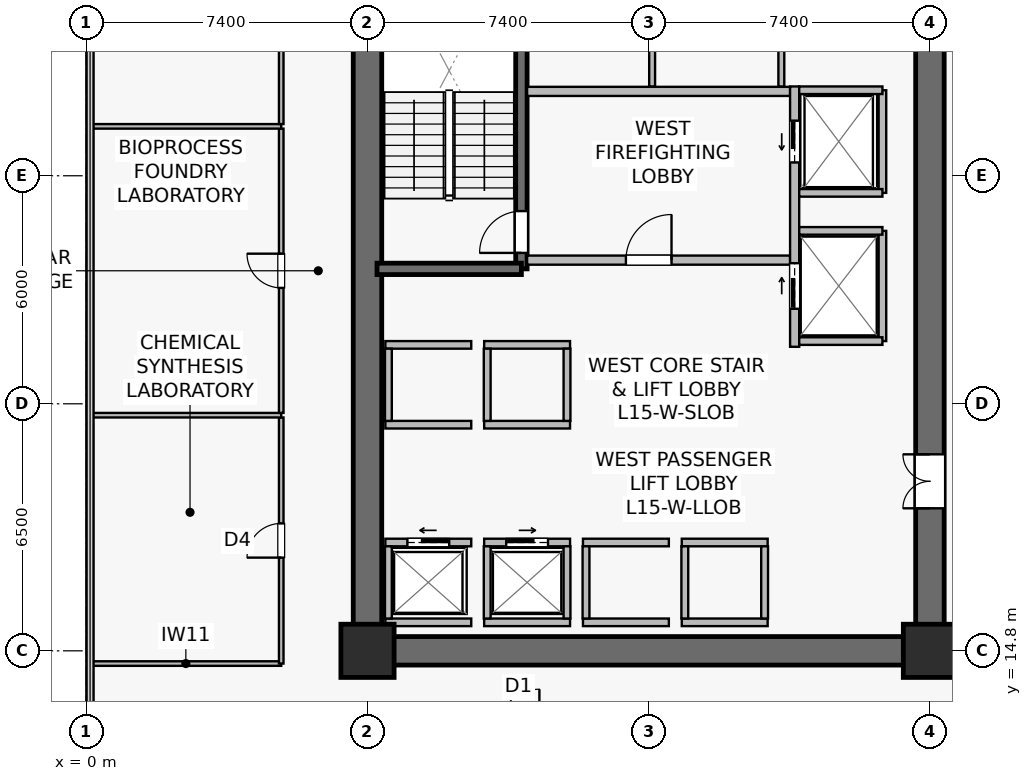
"""IFC4 building model, lengths in metres.
Left out: names, types, materials, properties, quantities, classifications, styles, units other than length and angle.
Written with IfcOpenShell. Run it as: python <this file> out.ifc"""

import sys

from ifc_helpers import new_model, si_unit, direction, frame, frame_2d, origin, origin_2d, place, context, subcontext, project, spatial, rectangle, extrude, source, transform, mapped, element, fill, save


model = new_model("IFC4")
c1 = context("Model", 3, precision=1e-05, world=origin(), true_north=direction((0.0, 1.0)))
c2 = subcontext(c1, "Body", "Model", "MODEL_VIEW")
j1 = project(units=[si_unit("LENGTHUNIT", "METRE"), si_unit("PLANEANGLEUNIT", "RADIAN")], contexts=[c1])
p1 = place(None, origin())
s1 = spatial("IfcSite", under=j1, at=p1, CompositionType="ELEMENT")
p2 = place(p1, origin())
s2 = spatial("IfcBuilding", under=s1, at=p2, CompositionType="ELEMENT")
p3 = place(p2, frame((0.0, 0.0, 62.1)))
s3 = spatial("IfcBuildingStorey", under=s2, at=p3, CompositionType="ELEMENT", Elevation=62.1)
p4 = place(p3, frame((7.025, 14.8, 0.0), z_axis=(0.0, 0.0, 1.0), x_axis=(1.0, 0.0, 0.0)))
e1 = element("IfcWall", 1, at=p4, inside=s3, PredefinedType="SHEAR", context=c2, shape_type="SweptSolid", body=[
    extrude(rectangle(XDim=15.55, YDim=0.75, at=frame_2d((7.775, 0.0))), origin(), (0.0, 0.0, 1.0), 3.78),
])
p5 = place(p3, frame((7.4, 15.175, 0.0), z_axis=(0.0, 0.0, 1.0), x_axis=(0.0, 1.0, 0.0)))
e2 = element("IfcWall", 2, at=p5, inside=s3, PredefinedType="SHEAR", context=c2, shape_type="SweptSolid", body=[
    extrude(rectangle(XDim=18.25, YDim=0.75, at=frame_2d((9.125, 0.0))), origin(), (0.0, 0.0, 1.0), 3.78),
])
p6 = place(p3, frame((22.2, 15.175, 0.0), z_axis=(0.0, 0.0, 1.0), x_axis=(0.0, 1.0, 0.0)))
e3 = element("IfcWall", 3, at=p6, inside=s3, PredefinedType="SHEAR", context=c2, shape_type="SweptSolid", body=[
    extrude(rectangle(XDim=18.25, YDim=0.75, at=frame_2d((9.125, 0.0))), origin(), (0.0, 0.0, 1.0), 3.78),
])
p7 = place(p6, frame((3.375, 0.0, 0.0)))
e4 = element("IfcOpeningElement", 4, at=p7, cuts=e3, PredefinedType="OPENING", context=c2, shape_type="SweptSolid", body=[
    extrude(rectangle(XDim=1.42, YDim=2.2, at=frame_2d((0.71, 1.1))), frame((0.0, 0.385, 0.0), z_axis=(0.0, -1.0, 0.0), x_axis=(1.0, 0.0, 0.0)), (0.0, 0.0, 1.0), 0.77),
])
p8 = place(p3, frame((11.45, 24.85, 0.0), z_axis=(0.0, 0.0, 1.0), x_axis=(0.0, 1.0, 0.0)))
e5 = element("IfcWall", 5, at=p8, inside=s3, PredefinedType="SHEAR", context=c2, shape_type="SweptSolid", body=[
    extrude(rectangle(XDim=8.63, YDim=0.3, at=frame_2d((4.315, 0.0))), origin(), (0.0, 0.0, 1.0), 3.78),
])
p9 = place(p8, frame((0.42, 0.0, 0.0)))
e6 = element("IfcOpeningElement", 6, at=p9, cuts=e5, PredefinedType="OPENING", context=c2, shape_type="SweptSolid", body=[
    extrude(rectangle(XDim=1.1, YDim=2.15, at=frame_2d((0.55, 1.075))), frame((0.0, 0.16, 0.0), z_axis=(0.0, -1.0, 0.0), x_axis=(1.0, 0.0, 0.0)), (0.0, 0.0, 1.0), 0.32),
])
p10 = place(p3, frame((7.65, 24.85, 0.0), z_axis=(0.0, 0.0, 1.0), x_axis=(1.0, 0.0, 0.0)))
e7 = element("IfcWall", 7, at=p10, inside=s3, PredefinedType="SHEAR", context=c2, shape_type="SweptSolid", body=[
    extrude(rectangle(XDim=3.8, YDim=0.3, at=frame_2d((1.9, 0.0))), origin(), (0.0, 0.0, 1.0), 3.78),
])
m1 = source(origin(), c2, "Body", "SweptSolid", [
    extrude(rectangle(XDim=1.4, YDim=1.4, at=origin_2d()), origin(), (0.0, 0.0, 1.0), 4.1),
])
for number, where, z_axis, x_axis in (
    (8, (7.4, 14.8, 0.0), (0.0, 0.0, 1.0), (1.0, 0.0, 0.0)),
    (9, (22.2, 14.8, 0.0), (0.0, 0.0, 1.0), (1.0, 0.0, 0.0)),
):
    element("IfcColumn", number, at=place(p3, frame(where, z_axis=z_axis, x_axis=x_axis)), inside=s3, PredefinedType="COLUMN", context=c2, shape_type="MappedRepresentation", body=[
        mapped(m1, transform((0.0, 0.0, 0.0), scale=1.0)),
    ])
p11 = place(p3, frame((11.6, 25.08, 0.0), z_axis=(0.0, 0.0, 1.0), x_axis=(1.0, 0.0, 0.0)))
e10 = element("IfcWall", 10, at=p11, inside=s3, PredefinedType="SOLIDWALL", context=c2, shape_type="SweptSolid", body=[
    extrude(rectangle(XDim=6.92, YDim=0.24, at=frame_2d((3.46, 0.0))), origin(), (0.0, 0.0, 1.0), 3.115),
])
p12 = place(p11, frame((2.6, 0.0, 0.0)))
e11 = element("IfcOpeningElement", 11, at=p12, cuts=e10, PredefinedType="OPENING", context=c2, shape_type="SweptSolid", body=[
    extrude(rectangle(XDim=1.2, YDim=2.16, at=frame_2d((0.6, 1.08))), frame((0.0, 0.13, 0.0), z_axis=(0.0, -1.0, 0.0), x_axis=(1.0, 0.0, 0.0)), (0.0, 0.0, 1.0), 0.26),
])
p13 = place(p3, frame((11.6, 29.52, 0.0), z_axis=(0.0, 0.0, 1.0), x_axis=(1.0, 0.0, 0.0)))
e12 = element("IfcWall", 12, at=p13, inside=s3, PredefinedType="SOLIDWALL", context=c2, shape_type="SweptSolid", body=[
    extrude(rectangle(XDim=6.92, YDim=0.24, at=frame_2d((3.46, 0.0))), origin(), (0.0, 0.0, 1.0), 3.115),
])
p14 = place(p3, frame((18.64, 22.8, 0.0), z_axis=(0.0, 0.0, 1.0), x_axis=(0.0, 1.0, 0.0)))
e13 = element("IfcWall", 13, at=p14, inside=s3, PredefinedType="SOLIDWALL", context=c2, shape_type="SweptSolid", body=[
    extrude(rectangle(XDim=6.85, YDim=0.24, at=frame_2d((3.425, 0.0))), origin(), (0.0, 0.0, 1.0), 2.865),
])
p15 = place(p14, frame((4.85, 0.0, 0.0)))
e14 = element("IfcOpeningElement", 14, at=p15, cuts=e13, PredefinedType="OPENING", context=c2, shape_type="SweptSolid", body=[
    extrude(rectangle(XDim=1.1, YDim=2.22, at=frame_2d((0.55, 1.11))), frame((0.0, 0.13, 0.0), z_axis=(0.0, -1.0, 0.0), x_axis=(1.0, 0.0, 0.0)), (0.0, 0.0, 1.0), 0.26),
])
p16 = place(p14, frame((1.0, 0.0, 0.0)))
e15 = element("IfcOpeningElement", 15, at=p16, cuts=e13, PredefinedType="OPENING", context=c2, shape_type="SweptSolid", body=[
    extrude(rectangle(XDim=1.2, YDim=2.22, at=frame_2d((0.6, 1.11))), frame((0.0, 0.13, 0.0), z_axis=(0.0, -1.0, 0.0), x_axis=(1.0, 0.0, 0.0)), (0.0, 0.0, 1.0), 0.26),
])
p17 = place(p3, frame((7.87, 17.65, 0.0), z_axis=(0.0, 0.0, 1.0), x_axis=(1.0, 0.0, 0.0)))
e16 = element("IfcWall", 16, at=p17, inside=s3, PredefinedType="SOLIDWALL", context=c2, shape_type="SweptSolid", body=[
    extrude(rectangle(XDim=2.26, YDim=0.2, at=frame_2d((1.13, 0.0))), origin(), (0.0, 0.0, 1.0), 3.78),
])
p18 = place(p17, frame((0.58, 0.0, 0.0)))
e17 = element("IfcOpeningElement", 17, at=p18, cuts=e16, PredefinedType="OPENING", context=c2, shape_type="SweptSolid", body=[
    extrude(rectangle(XDim=1.1, YDim=2.22, at=frame_2d((0.55, 1.11))), frame((0.0, 0.11, 0.0), z_axis=(0.0, -1.0, 0.0), x_axis=(1.0, 0.0, 0.0)), (0.0, 0.0, 1.0), 0.22),
])
p19 = place(p3, frame((7.87, 15.55, 0.0), z_axis=(0.0, 0.0, 1.0), x_axis=(1.0, 0.0, 0.0)))
e18 = element("IfcWall", 18, at=p19, inside=s3, PredefinedType="SOLIDWALL", context=c2, shape_type="SweptSolid", body=[
    extrude(rectangle(XDim=2.26, YDim=0.2, at=frame_2d((1.13, 0.0))), origin(), (0.0, 0.0, 1.0), 3.78),
])
p20 = place(p3, frame((7.95, 15.65, 0.0), z_axis=(0.0, 0.0, 1.0), x_axis=(0.0, 1.0, 0.0)))
e19 = element("IfcWall", 19, at=p20, inside=s3, PredefinedType="SOLIDWALL", context=c2, shape_type="SweptSolid", body=[
    extrude(rectangle(XDim=1.9, YDim=0.18, at=frame_2d((0.95, 0.0))), origin(), (0.0, 0.0, 1.0), 3.78),
])
p21 = place(p3, frame((10.47, 17.65, 0.0), z_axis=(0.0, 0.0, 1.0), x_axis=(1.0, 0.0, 0.0)))
e20 = element("IfcWall", 20, at=p21, inside=s3, PredefinedType="SOLIDWALL", context=c2, shape_type="SweptSolid", body=[
    extrude(rectangle(XDim=2.26, YDim=0.2, at=frame_2d((1.13, 0.0))), origin(), (0.0, 0.0, 1.0), 3.78),
])
p22 = place(p21, frame((0.58, 0.0, 0.0)))
e21 = element("IfcOpeningElement", 21, at=p22, cuts=e20, PredefinedType="OPENING", context=c2, shape_type="SweptSolid", body=[
    extrude(rectangle(XDim=1.1, YDim=2.22, at=frame_2d((0.55, 1.11))), frame((0.0, 0.11, 0.0), z_axis=(0.0, -1.0, 0.0), x_axis=(1.0, 0.0, 0.0)), (0.0, 0.0, 1.0), 0.22),
])
p23 = place(p3, frame((10.47, 15.55, 0.0), z_axis=(0.0, 0.0, 1.0), x_axis=(1.0, 0.0, 0.0)))
e22 = element("IfcWall", 22, at=p23, inside=s3, PredefinedType="SOLIDWALL", context=c2, shape_type="SweptSolid", body=[
    extrude(rectangle(XDim=2.26, YDim=0.2, at=frame_2d((1.13, 0.0))), origin(), (0.0, 0.0, 1.0), 3.78),
])
for number, where, z_axis, x_axis in (
    (23, (10.55, 15.65, 0.0), (0.0, 0.0, 1.0), (0.0, 1.0, 0.0)),
    (24, (12.65, 15.65, 0.0), (0.0, 0.0, 1.0), (0.0, 1.0, 0.0)),
):
    element("IfcWall", number, at=place(p3, frame(where, z_axis=z_axis, x_axis=x_axis)), inside=s3, PredefinedType="SOLIDWALL", context=c2, shape_type="SweptSolid", body=[
        extrude(rectangle(XDim=1.9, YDim=0.18, at=frame_2d((0.95, 0.0))), origin(), (0.0, 0.0, 1.0), 3.78),
    ])
for number, where, z_axis, x_axis in (
    (25, (13.07, 17.65, 0.0), (0.0, 0.0, 1.0), (1.0, 0.0, 0.0)),
    (26, (13.07, 15.55, 0.0), (0.0, 0.0, 1.0), (1.0, 0.0, 0.0)),
):
    element("IfcWall", number, at=place(p3, frame(where, z_axis=z_axis, x_axis=x_axis)), inside=s3, PredefinedType="SOLIDWALL", context=c2, shape_type="SweptSolid", body=[
        extrude(rectangle(XDim=2.26, YDim=0.2, at=frame_2d((1.13, 0.0))), origin(), (0.0, 0.0, 1.0), 3.115),
    ])
p24 = place(p3, frame((13.15, 15.65, 0.0), z_axis=(0.0, 0.0, 1.0), x_axis=(0.0, 1.0, 0.0)))
e27 = element("IfcWall", 27, at=p24, inside=s3, PredefinedType="SOLIDWALL", context=c2, shape_type="SweptSolid", body=[
    extrude(rectangle(XDim=1.9, YDim=0.18, at=frame_2d((0.95, 0.0))), origin(), (0.0, 0.0, 1.0), 3.78),
])
for number, where, z_axis, x_axis in (
    (28, (15.67, 17.65, 0.0), (0.0, 0.0, 1.0), (1.0, 0.0, 0.0)),
    (29, (15.67, 15.55, 0.0), (0.0, 0.0, 1.0), (1.0, 0.0, 0.0)),
):
    element("IfcWall", number, at=place(p3, frame(where, z_axis=z_axis, x_axis=x_axis)), inside=s3, PredefinedType="SOLIDWALL", context=c2, shape_type="SweptSolid", body=[
        extrude(rectangle(XDim=2.26, YDim=0.2, at=frame_2d((1.13, 0.0))), origin(), (0.0, 0.0, 1.0), 3.78),
    ])
for number, where, z_axis, x_axis in (
    (30, (15.75, 15.65, 0.0), (0.0, 0.0, 1.0), (0.0, 1.0, 0.0)),
    (31, (17.85, 15.65, 0.0), (0.0, 0.0, 1.0), (0.0, 1.0, 0.0)),
):
    element("IfcWall", number, at=place(p3, frame(where, z_axis=z_axis, x_axis=x_axis)), inside=s3, PredefinedType="SOLIDWALL", context=c2, shape_type="SweptSolid", body=[
        extrude(rectangle(XDim=1.9, YDim=0.18, at=frame_2d((0.95, 0.0))), origin(), (0.0, 0.0, 1.0), 3.78),
    ])
for number, where, z_axis, x_axis in (
    (32, (7.87, 20.75, 0.0), (0.0, 0.0, 1.0), (1.0, 0.0, 0.0)),
    (33, (7.87, 22.85, 0.0), (0.0, 0.0, 1.0), (1.0, 0.0, 0.0)),
):
    element("IfcWall", number, at=place(p3, frame(where, z_axis=z_axis, x_axis=x_axis)), inside=s3, PredefinedType="SOLIDWALL", context=c2, shape_type="SweptSolid", body=[
        extrude(rectangle(XDim=2.26, YDim=0.2, at=frame_2d((1.13, 0.0))), origin(), (0.0, 0.0, 1.0), 3.78),
    ])
p25 = place(p3, frame((7.95, 20.85, 0.0), z_axis=(0.0, 0.0, 1.0), x_axis=(0.0, 1.0, 0.0)))
e34 = element("IfcWall", 34, at=p25, inside=s3, PredefinedType="SOLIDWALL", context=c2, shape_type="SweptSolid", body=[
    extrude(rectangle(XDim=1.9, YDim=0.18, at=frame_2d((0.95, 0.0))), origin(), (0.0, 0.0, 1.0), 3.78),
])
for number, where, z_axis, x_axis in (
    (35, (10.47, 20.75, 0.0), (0.0, 0.0, 1.0), (1.0, 0.0, 0.0)),
    (36, (10.47, 22.85, 0.0), (0.0, 0.0, 1.0), (1.0, 0.0, 0.0)),
):
    element("IfcWall", number, at=place(p3, frame(where, z_axis=z_axis, x_axis=x_axis)), inside=s3, PredefinedType="SOLIDWALL", context=c2, shape_type="SweptSolid", body=[
        extrude(rectangle(XDim=2.26, YDim=0.2, at=frame_2d((1.13, 0.0))), origin(), (0.0, 0.0, 1.0), 3.78),
    ])
for number, where, z_axis, x_axis in (
    (37, (10.55, 20.85, 0.0), (0.0, 0.0, 1.0), (0.0, 1.0, 0.0)),
    (38, (12.65, 20.85, 0.0), (0.0, 0.0, 1.0), (0.0, 1.0, 0.0)),
):
    element("IfcWall", number, at=place(p3, frame(where, z_axis=z_axis, x_axis=x_axis)), inside=s3, PredefinedType="SOLIDWALL", context=c2, shape_type="SweptSolid", body=[
        extrude(rectangle(XDim=1.9, YDim=0.18, at=frame_2d((0.95, 0.0))), origin(), (0.0, 0.0, 1.0), 3.78),
    ])
p26 = place(p3, frame((20.95, 26.85, 0.0), z_axis=(0.0, 0.0, 1.0), x_axis=(0.0, 1.0, 0.0)))
e39 = element("IfcWall", 39, at=p26, inside=s3, PredefinedType="SOLIDWALL", context=c2, shape_type="SweptSolid", body=[
    extrude(rectangle(XDim=2.7, YDim=0.2, at=frame_2d((1.35, 0.0))), origin(), (0.0, 0.0, 1.0), 3.78),
])
p27 = place(p3, frame((18.76, 29.55, 0.0), z_axis=(0.0, 0.0, 1.0), x_axis=(1.0, 0.0, 0.0)))
e40 = element("IfcWall", 40, at=p27, inside=s3, PredefinedType="SOLIDWALL", context=c2, shape_type="SweptSolid", body=[
    extrude(rectangle(XDim=2.19, YDim=0.2, at=frame_2d((1.095, 0.0))), origin(), (0.0, 0.0, 1.0), 3.78),
])
p28 = place(p3, frame((18.76, 26.85, 0.0), z_axis=(0.0, 0.0, 1.0), x_axis=(1.0, 0.0, 0.0)))
e41 = element("IfcWall", 41, at=p28, inside=s3, PredefinedType="SOLIDWALL", context=c2, shape_type="SweptSolid", body=[
    extrude(rectangle(XDim=2.19, YDim=0.2, at=frame_2d((1.095, 0.0))), origin(), (0.0, 0.0, 1.0), 3.177),
])
p29 = place(p3, frame((20.95, 22.95, 0.0), z_axis=(0.0, 0.0, 1.0), x_axis=(0.0, 1.0, 0.0)))
e42 = element("IfcWall", 42, at=p29, inside=s3, PredefinedType="SOLIDWALL", context=c2, shape_type="SweptSolid", body=[
    extrude(rectangle(XDim=2.9, YDim=0.2, at=frame_2d((1.45, 0.0))), origin(), (0.0, 0.0, 1.0), 2.865),
])
for number, where, z_axis, x_axis in (
    (43, (18.76, 25.85, 0.0), (0.0, 0.0, 1.0), (1.0, 0.0, 0.0)),
    (44, (18.76, 22.95, 0.0), (0.0, 0.0, 1.0), (1.0, 0.0, 0.0)),
):
    element("IfcWall", number, at=place(p3, frame(where, z_axis=z_axis, x_axis=x_axis)), inside=s3, PredefinedType="SOLIDWALL", context=c2, shape_type="SweptSolid", body=[
        extrude(rectangle(XDim=2.19, YDim=0.2, at=frame_2d((1.095, 0.0))), origin(), (0.0, 0.0, 1.0), 3.78),
    ])
p30 = place(p3, frame((14.89, 29.65, 0.0), z_axis=(0.0, 0.0, 1.0), x_axis=(0.0, 1.0, 0.0)))
e45 = element("IfcWall", 45, at=p30, inside=s3, PredefinedType="PLUMBINGWALL", context=c2, shape_type="SweptSolid", body=[
    extrude(rectangle(XDim=3.93, YDim=0.155, at=frame_2d((1.965, 0.0))), origin(), (0.0, 0.0, 1.0), 3.115),
])
p31 = place(p3, frame((18.29, 29.65, 0.0), z_axis=(0.0, 0.0, 1.0), x_axis=(0.0, 1.0, 0.0)))
e46 = element("IfcWall", 46, at=p31, inside=s3, PredefinedType="PLUMBINGWALL", context=c2, shape_type="SweptSolid", body=[
    extrude(rectangle(XDim=3.93, YDim=0.155, at=frame_2d((1.965, 0.0))), origin(), (0.0, 0.0, 1.0), 3.78),
])
p32 = place(p3, frame((0.11, 14.465, 0.0), z_axis=(0.0, 0.0, 1.0), x_axis=(1.0, 0.0, 0.0)))
e47 = element("IfcWall", 47, at=p32, inside=s3, PredefinedType="PARTITIONING", context=c2, shape_type="SweptSolid", body=[
    extrude(rectangle(XDim=5.02, YDim=0.12, at=frame_2d((2.51, 0.0))), origin(), (0.0, 0.0, 1.0), 3.78),
])
p33 = place(p3, frame((5.13, 14.465, 0.0), z_axis=(0.0, 0.0, 1.0), x_axis=(0.0, 1.0, 0.0)))
e48 = element("IfcWall", 48, at=p33, inside=s3, PredefinedType="PARTITIONING", context=c2, shape_type="SweptSolid", body=[
    extrude(rectangle(XDim=6.475, YDim=0.12, at=frame_2d((3.237, 0.0))), origin(), (0.0, 0.0, 1.0), 3.78),
])
p34 = place(p33, frame((2.788, 0.0, 0.0)))
e49 = element("IfcOpeningElement", 49, at=p34, cuts=e48, PredefinedType="OPENING", context=c2, shape_type="SweptSolid", body=[
    extrude(rectangle(XDim=0.9, YDim=2.1, at=frame_2d((0.45, 1.05))), frame((0.0, 0.07, 0.0), z_axis=(0.0, -1.0, 0.0), x_axis=(1.0, 0.0, 0.0)), (0.0, 0.0, 1.0), 0.14),
])
p35 = place(p3, frame((0.11, 21.0, 0.0), z_axis=(0.0, 0.0, 1.0), x_axis=(1.0, 0.0, 0.0)))
e50 = element("IfcWall", 50, at=p35, inside=s3, PredefinedType="PARTITIONING", context=c2, shape_type="SweptSolid", body=[
    extrude(rectangle(XDim=5.02, YDim=0.12, at=frame_2d((2.51, 0.0))), origin(), (0.0, 0.0, 1.0), 3.78),
])
p36 = place(p3, frame((5.13, 21.06, 0.0), z_axis=(0.0, 0.0, 1.0), x_axis=(0.0, 1.0, 0.0)))
e51 = element("IfcWall", 51, at=p36, inside=s3, PredefinedType="PARTITIONING", context=c2, shape_type="SweptSolid", body=[
    extrude(rectangle(XDim=7.48, YDim=0.12, at=frame_2d((3.74, 0.0))), origin(), (0.0, 0.0, 1.0), 3.78),
])
p37 = place(p36, frame((3.29, 0.0, 0.0)))
e52 = element("IfcOpeningElement", 52, at=p37, cuts=e51, PredefinedType="OPENING", context=c2, shape_type="SweptSolid", body=[
    extrude(rectangle(XDim=0.9, YDim=2.1, at=frame_2d((0.45, 1.05))), frame((0.0, 0.07, 0.0), z_axis=(0.0, -1.0, 0.0), x_axis=(1.0, 0.0, 0.0)), (0.0, 0.0, 1.0), 0.14),
])
p38 = place(p3, frame((0.11, 28.6, 0.0), z_axis=(0.0, 0.0, 1.0), x_axis=(1.0, 0.0, 0.0)))
e53 = element("IfcWall", 53, at=p38, inside=s3, PredefinedType="PARTITIONING", context=c2, shape_type="SweptSolid", body=[
    extrude(rectangle(XDim=5.02, YDim=0.12, at=frame_2d((2.51, 0.0))), origin(), (0.0, 0.0, 1.0), 3.78),
])
p39 = place(p3, frame((5.13, 28.66, 0.0), z_axis=(0.0, 0.0, 1.0), x_axis=(0.0, 1.0, 0.0)))
e54 = element("IfcWall", 54, at=p39, inside=s3, PredefinedType="PARTITIONING", context=c2, shape_type="SweptSolid", body=[
    extrude(rectangle(XDim=5.475, YDim=0.12, at=frame_2d((2.738, 0.0))), origin(), (0.0, 0.0, 1.0), 3.78),
])
p40 = place(p39, frame((2.288, 0.0, 0.0)))
e55 = element("IfcOpeningElement", 55, at=p40, cuts=e54, PredefinedType="OPENING", context=c2, shape_type="SweptSolid", body=[
    extrude(rectangle(XDim=0.9, YDim=2.1, at=frame_2d((0.45, 1.05))), frame((0.0, 0.07, 0.0), z_axis=(0.0, -1.0, 0.0), x_axis=(1.0, 0.0, 0.0)), (0.0, 0.0, 1.0), 0.14),
])
m2 = source(origin(), c2, "Body", "SweptSolid", [
    extrude(rectangle(XDim=1.1, YDim=2.15, at=frame_2d((0.55, 1.075))), frame((0.0, 0.025, 0.0), z_axis=(0.0, -1.0, 0.0), x_axis=(1.0, 0.0, 0.0)), (0.0, 0.0, 1.0), 0.05),
])
p41 = place(p9, origin())
e56 = element("IfcDoor", 56, at=p41, inside=s3, OperationType="SINGLE_SWING_LEFT", PredefinedType="DOOR", context=c2, shape_type="MappedRepresentation", body=[
    mapped(m2, transform((0.0, 0.0, 0.0), scale=1.0)),
])
fill(e6, e56)
m3 = source(origin(), c2, "Body", "SweptSolid", [
    extrude(rectangle(XDim=1.2, YDim=2.16, at=frame_2d((0.6, 1.08))), frame((0.0, 0.025, 0.0), z_axis=(0.0, -1.0, 0.0), x_axis=(1.0, 0.0, 0.0)), (0.0, 0.0, 1.0), 0.05),
])
p42 = place(p12, origin())
e57 = element("IfcDoor", 57, at=p42, inside=s3, OperationType="SINGLE_SWING_RIGHT", PredefinedType="DOOR", context=c2, shape_type="MappedRepresentation", body=[
    mapped(m3, transform((0.0, 0.0, 0.0), scale=1.0)),
])
fill(e11, e57)
m4 = source(origin(), c2, "Body", "SweptSolid", [
    extrude(rectangle(XDim=1.1, YDim=2.22, at=frame_2d((0.55, 1.11))), frame((0.0, 0.025, 0.0), z_axis=(0.0, -1.0, 0.0), x_axis=(1.0, 0.0, 0.0)), (0.0, 0.0, 1.0), 0.05),
])
p43 = place(p18, origin())
e58 = element("IfcDoor", 58, at=p43, inside=s3, OperationType="SLIDING_TO_LEFT", PredefinedType="USERDEFINED", context=c2, shape_type="MappedRepresentation", body=[
    mapped(m4, transform((0.0, 0.0, 0.0), scale=1.0)),
])
fill(e17, e58)
p44 = place(p22, origin())
e59 = element("IfcDoor", 59, at=p44, inside=s3, OperationType="SLIDING_TO_RIGHT", PredefinedType="USERDEFINED", context=c2, shape_type="MappedRepresentation", body=[
    mapped(m4, transform((0.0, 0.0, 0.0), scale=1.0)),
])
fill(e21, e59)
p45 = place(p15, origin())
e60 = element("IfcDoor", 60, at=p45, inside=s3, OperationType="SLIDING_TO_LEFT", PredefinedType="USERDEFINED", context=c2, shape_type="MappedRepresentation", body=[
    mapped(m4, transform((0.0, 0.0, 0.0), scale=1.0)),
])
fill(e14, e60)
m5 = source(origin(), c2, "Body", "SweptSolid", [
    extrude(rectangle(XDim=1.2, YDim=2.22, at=frame_2d((0.6, 1.11))), frame((0.0, 0.025, 0.0), z_axis=(0.0, -1.0, 0.0), x_axis=(1.0, 0.0, 0.0)), (0.0, 0.0, 1.0), 0.05),
])
p46 = place(p16, origin())
e61 = element("IfcDoor", 61, at=p46, inside=s3, OperationType="SLIDING_TO_RIGHT", PredefinedType="USERDEFINED", context=c2, shape_type="MappedRepresentation", body=[
    mapped(m5, transform((0.0, 0.0, 0.0), scale=1.0)),
])
fill(e15, e61)
m6 = source(origin(), c2, "Body", "SweptSolid", [
    extrude(rectangle(XDim=1.42, YDim=2.2, at=frame_2d((0.71, 1.1))), frame((0.0, 0.025, 0.0), z_axis=(0.0, -1.0, 0.0), x_axis=(1.0, 0.0, 0.0)), (0.0, 0.0, 1.0), 0.05),
])
p47 = place(p7, origin())
e62 = element("IfcDoor", 62, at=p47, inside=s3, OperationType="DOUBLE_DOOR_SINGLE_SWING", PredefinedType="DOOR", context=c2, shape_type="MappedRepresentation", body=[
    mapped(m6, transform((0.0, 0.0, 0.0), scale=1.0)),
])
fill(e4, e62)
m7 = source(origin(), c2, "Body", "SweptSolid", [
    extrude(rectangle(XDim=0.9, YDim=2.1, at=frame_2d((0.45, 1.05))), frame((0.0, 0.025, 0.0), z_axis=(0.0, -1.0, 0.0), x_axis=(1.0, 0.0, 0.0)), (0.0, 0.0, 1.0), 0.05),
])
p48 = place(p34, origin())
e63 = element("IfcDoor", 63, at=p48, inside=s3, OperationType="SINGLE_SWING_LEFT", PredefinedType="DOOR", context=c2, shape_type="MappedRepresentation", body=[
    mapped(m7, transform((0.0, 0.0, 0.0), scale=1.0)),
])
fill(e49, e63)
p49 = place(p37, origin())
e64 = element("IfcDoor", 64, at=p49, inside=s3, OperationType="SINGLE_SWING_RIGHT", PredefinedType="DOOR", context=c2, shape_type="MappedRepresentation", body=[
    mapped(m7, transform((0.0, 0.0, 0.0), scale=1.0)),
])
fill(e52, e64)
save(model, sys.argv[1])
